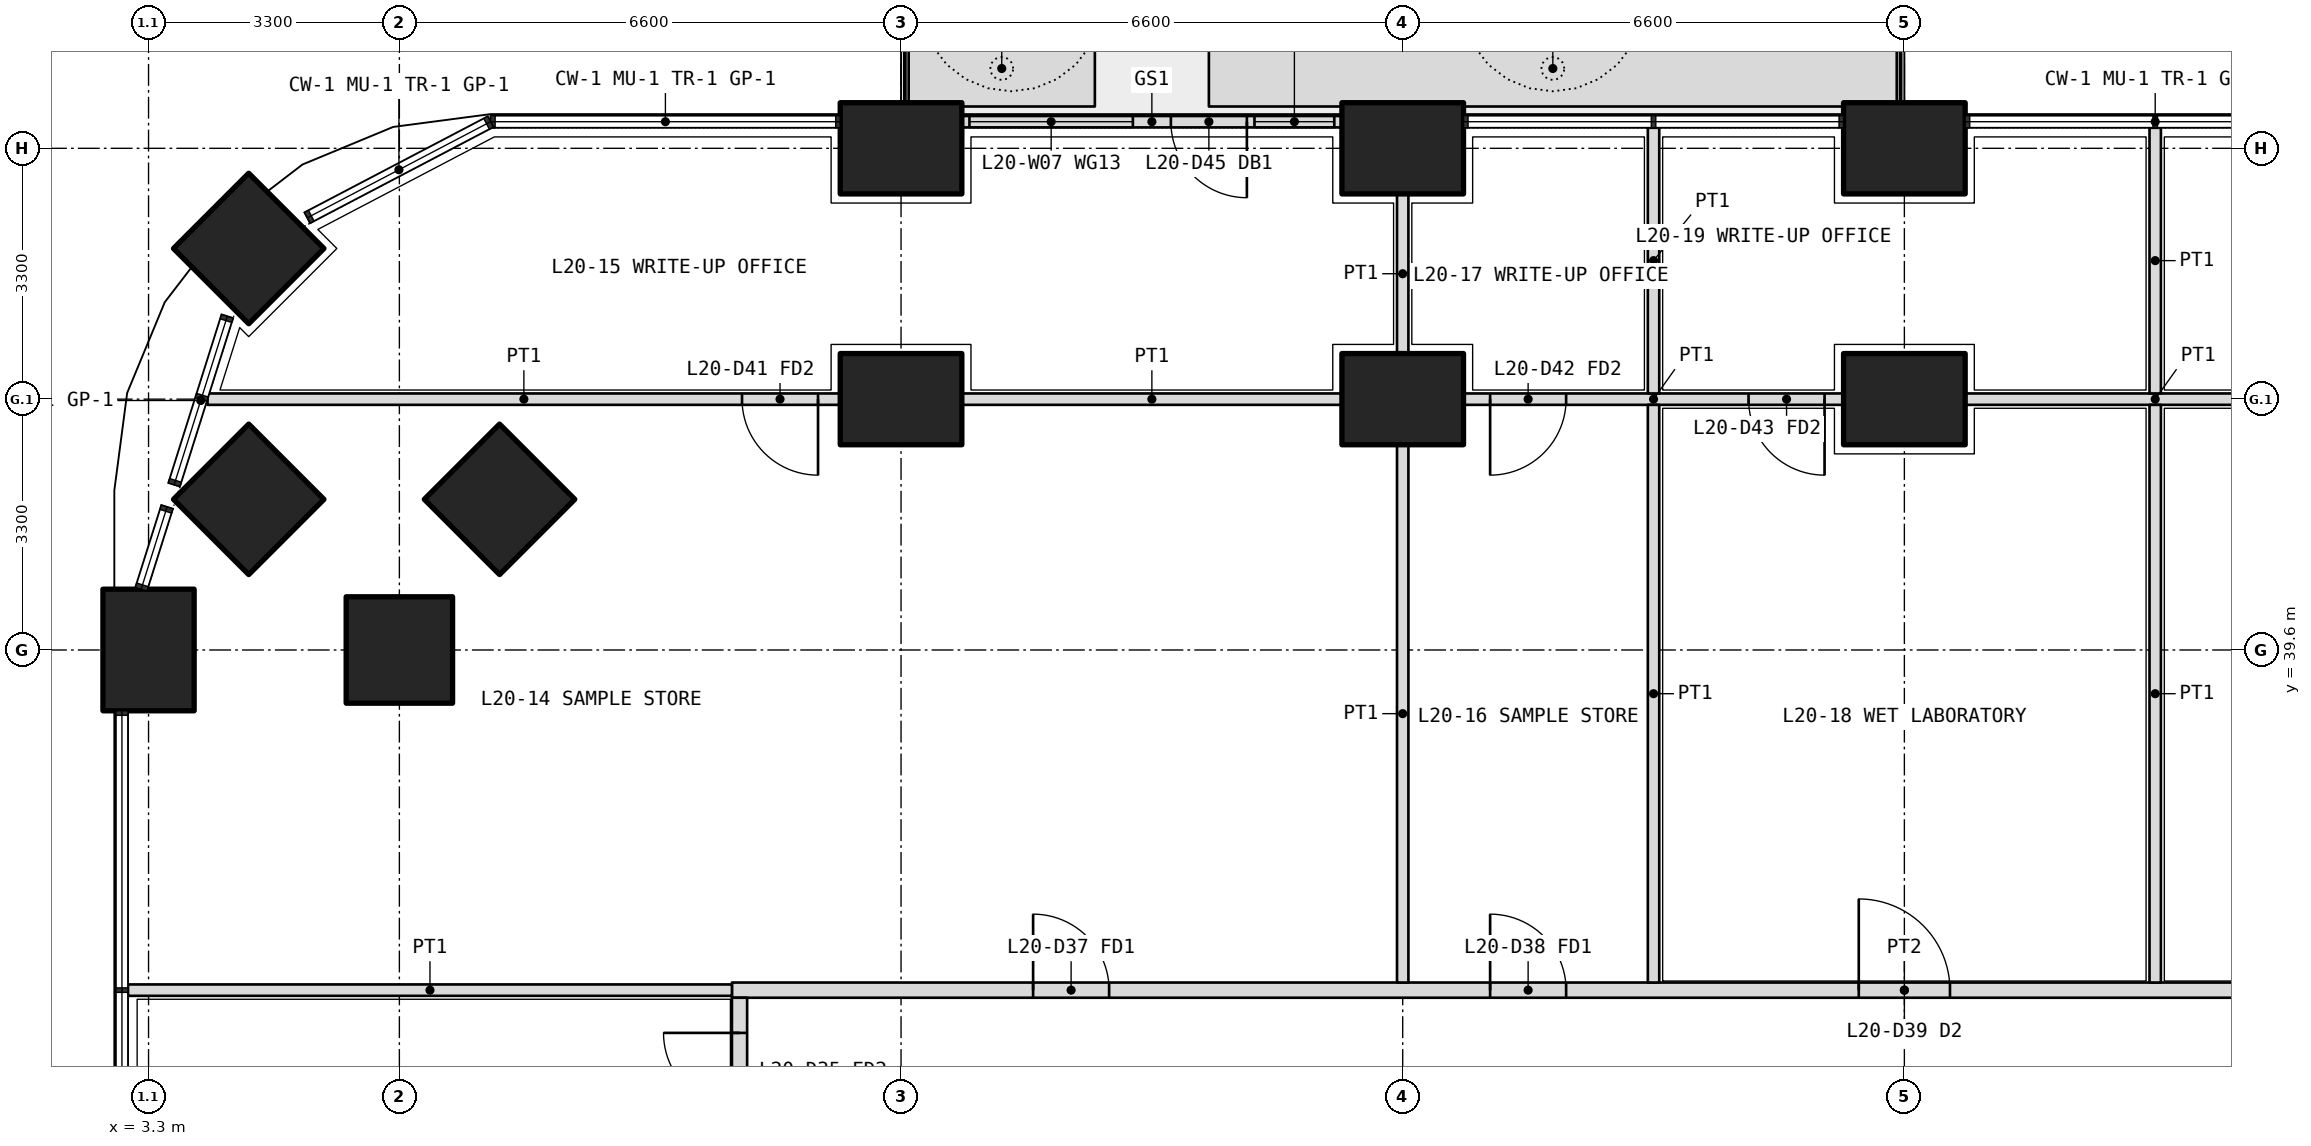
"""IFC4 building model, lengths in metres.
Left out: names, types, materials, properties, quantities, classifications, styles, units other than length and angle.
Written with IfcOpenShell. Run it as: python <this file> out.ifc"""

import sys

from ifc_helpers import new_model, si_unit, direction, frame, frame_2d, origin, origin_2d, place, context, subcontext, project, spatial, polyline, rectangle, outline, extrude, element, fill, save


model = new_model("IFC4")
c1 = context("Model", 3, precision=1e-05, world=origin(), true_north=direction((0.0, 1.0)))
c2 = subcontext(c1, "Body", "Model", "MODEL_VIEW")
j1 = project(units=[si_unit("LENGTHUNIT", "METRE"), si_unit("PLANEANGLEUNIT", "RADIAN")], contexts=[c1])
p1 = place(None, origin())
s1 = spatial("IfcSite", under=j1, at=p1, CompositionType="ELEMENT")
p2 = place(p1, origin())
s2 = spatial("IfcBuilding", under=s1, at=p2, CompositionType="ELEMENT")
p3 = place(p2, frame((0.0, 0.0, 90.6)))
s3 = spatial("IfcBuildingStorey", under=s2, at=p3, CompositionType="ELEMENT", Elevation=90.6)
p4 = place(p3, frame((4.618, 44.882, 0.0), z_axis=(0.0, 0.0, 1.0), x_axis=(0.707106781187, 0.707106781187, 0.0)))
e1 = element("IfcColumn", 1, at=p4, inside=s3, PredefinedType="COLUMN", context=c2, shape_type="SweptSolid", body=[
    extrude(rectangle(XDim=1.4, YDim=1.4, at=origin_2d()), origin(), (0.0, 0.0, 1.0), 4.2),
])
for number, where, z_axis, x_axis in (
    (2, (3.3, 39.6, 0.0), (0.0, 0.0, 1.0), (0.0, 1.0, 0.0)),
    (3, (13.2, 46.2, 0.0), (0.0, 0.0, 1.0), (1.0, 0.0, 0.0)),
    (4, (19.8, 46.2, 0.0), (0.0, 0.0, 1.0), (1.0, 0.0, 0.0)),
    (5, (26.4, 46.2, 0.0), (0.0, 0.0, 1.0), (1.0, 0.0, 0.0)),
):
    element("IfcColumn", number, at=place(p3, frame(where, z_axis=z_axis, x_axis=x_axis)), inside=s3, PredefinedType="COLUMN", context=c2, shape_type="SweptSolid", body=[
        extrude(rectangle(XDim=1.6, YDim=1.2, at=origin_2d()), origin(), (0.0, 0.0, 1.0), 4.2),
    ])
for number, where, z_axis, x_axis in (
    (6, (6.6, 39.6, 0.0), (0.0, 0.0, 1.0), (1.0, 0.0, 0.0)),
    (7, (4.618, 41.582, 0.0), (0.0, 0.0, 1.0), (0.707, 0.707, 0.0)),
):
    element("IfcColumn", number, at=place(p3, frame(where, z_axis=z_axis, x_axis=x_axis)), inside=s3, PredefinedType="COLUMN", context=c2, shape_type="SweptSolid", body=[
        extrude(rectangle(XDim=1.4, YDim=1.4, at=origin_2d()), origin(), (0.0, 0.0, 1.0), 4.2),
    ])
for number, where, z_axis, x_axis in (
    (8, (13.2, 42.9, 0.0), (0.0, 0.0, 1.0), (1.0, 0.0, 0.0)),
    (9, (19.8, 42.9, 0.0), (0.0, 0.0, 1.0), (1.0, 0.0, 0.0)),
    (10, (26.4, 42.9, 0.0), (0.0, 0.0, 1.0), (1.0, 0.0, 0.0)),
):
    element("IfcColumn", number, at=place(p3, frame(where, z_axis=z_axis, x_axis=x_axis)), inside=s3, PredefinedType="COLUMN", context=c2, shape_type="SweptSolid", body=[
        extrude(rectangle(XDim=1.6, YDim=1.2, at=origin_2d()), origin(), (0.0, 0.0, 1.0), 4.2),
    ])
p5 = place(p3, frame((7.918, 41.582, 0.0), z_axis=(0.0, 0.0, 1.0), x_axis=(0.707106781187, 0.707106781187, 0.0)))
e11 = element("IfcColumn", 11, at=p5, inside=s3, PredefinedType="COLUMN", context=c2, shape_type="SweptSolid", body=[
    extrude(rectangle(XDim=1.4, YDim=1.4, at=origin_2d()), origin(), (0.0, 0.0, 1.0), 4.2),
])
p6 = place(p3, origin())
e12 = element("IfcWall", 12, at=p6, inside=s3, PredefinedType="USERDEFINED", context=c2, shape_type="SweptSolid", body=[
    extrude(outline(polyline([(13.3, 46.75), (15.75, 46.75), (15.75, 47.75), (13.3, 47.75), (13.3, 46.75)]), holes=[polyline([(13.45, 46.9), (15.6, 46.9), (15.6, 47.6), (13.45, 47.6), (13.45, 46.9)])]), origin(), (0.0, 0.0, 1.0), 1.05),
])
p7 = place(p3, origin())
e13 = element("IfcWall", 13, at=p7, inside=s3, PredefinedType="USERDEFINED", context=c2, shape_type="SweptSolid", body=[
    extrude(outline(polyline([(17.25, 46.75), (26.3, 46.75), (26.3, 47.75), (17.25, 47.75), (17.25, 46.75)]), holes=[polyline([(17.4, 46.9), (26.15, 46.9), (26.15, 47.6), (17.4, 47.6), (17.4, 46.9)])]), origin(), (0.0, 0.0, 1.0), 1.05),
])
p8 = place(p3, frame((19.0, 46.55, 0.0), z_axis=(0.0, 0.0, 1.0), x_axis=(-1.0, 0.0, 0.0)))
e14 = element("IfcWall", 14, at=p8, inside=s3, PredefinedType="SOLIDWALL", context=c2, shape_type="SweptSolid", body=[
    extrude(rectangle(XDim=5.0, YDim=0.15, at=frame_2d((2.5, 0.0))), origin(), (0.0, 0.0, 1.0), 2.7),
])
p9 = place(p8, frame((1.25, 0.0, 0.0)))
e15 = element("IfcOpeningElement", 15, at=p9, cuts=e14, PredefinedType="OPENING", context=c2, shape_type="SweptSolid", body=[
    extrude(rectangle(XDim=1.0, YDim=2.4, at=frame_2d((0.5, 1.2))), frame((0.0, 0.085, 0.0), z_axis=(0.0, -1.0, 0.0), x_axis=(1.0, 0.0, 0.0)), (0.0, 0.0, 1.0), 0.17),
])
p10 = place(p8, frame((0.1, 0.0, 0.1)))
e16 = element("IfcOpeningElement", 16, at=p10, cuts=e14, PredefinedType="OPENING", context=c2, shape_type="SweptSolid", body=[
    extrude(rectangle(XDim=1.05, YDim=2.3, at=frame_2d((0.525, 1.15))), frame((0.0, 0.085, 0.0), z_axis=(0.0, -1.0, 0.0), x_axis=(1.0, 0.0, 0.0)), (0.0, 0.0, 1.0), 0.17),
])
p11 = place(p8, frame((2.75, 0.0, 0.1)))
e17 = element("IfcOpeningElement", 17, at=p11, cuts=e14, PredefinedType="OPENING", context=c2, shape_type="SweptSolid", body=[
    extrude(rectangle(XDim=2.15, YDim=2.3, at=frame_2d((1.075, 1.15))), frame((0.0, 0.085, 0.0), z_axis=(0.0, -1.0, 0.0), x_axis=(1.0, 0.0, 0.0)), (0.0, 0.0, 1.0), 0.17),
])
p12 = place(p3, frame((10.975, 35.125, 0.0), z_axis=(0.0, 0.0, 1.0), x_axis=(1.0, 0.0, 0.0)))
e18 = element("IfcWall", 18, at=p12, inside=s3, PredefinedType="PARTITIONING", context=c2, shape_type="SweptSolid", body=[
    extrude(rectangle(XDim=30.85, YDim=0.2, at=frame_2d((15.425, 0.0))), origin(), (0.0, 0.0, 1.0), 2.85),
])
p13 = place(p12, frame((3.962, 0.0, 0.0)))
e19 = element("IfcOpeningElement", 19, at=p13, cuts=e18, PredefinedType="OPENING", context=c2, shape_type="SweptSolid", body=[
    extrude(rectangle(XDim=1.0, YDim=2.1, at=frame_2d((0.5, 1.05))), frame((0.0, 0.11, 0.0), z_axis=(0.0, -1.0, 0.0), x_axis=(1.0, 0.0, 0.0)), (0.0, 0.0, 1.0), 0.22),
])
p14 = place(p12, frame((9.975, 0.0, 0.0)))
e20 = element("IfcOpeningElement", 20, at=p14, cuts=e18, PredefinedType="OPENING", context=c2, shape_type="SweptSolid", body=[
    extrude(rectangle(XDim=1.0, YDim=2.1, at=frame_2d((0.5, 1.05))), frame((0.0, 0.11, 0.0), z_axis=(0.0, -1.0, 0.0), x_axis=(1.0, 0.0, 0.0)), (0.0, 0.0, 1.0), 0.22),
])
p15 = place(p12, frame((14.825, 0.0, 0.0)))
e21 = element("IfcOpeningElement", 21, at=p15, cuts=e18, PredefinedType="OPENING", context=c2, shape_type="SweptSolid", body=[
    extrude(rectangle(XDim=1.2, YDim=2.1, at=frame_2d((0.6, 1.05))), frame((0.0, 0.11, 0.0), z_axis=(0.0, -1.0, 0.0), x_axis=(1.0, 0.0, 0.0)), (0.0, 0.0, 1.0), 0.22),
])
p16 = place(p12, frame((24.238, 0.0, 0.0)))
e22 = element("IfcOpeningElement", 22, at=p16, cuts=e18, PredefinedType="OPENING", context=c2, shape_type="SweptSolid", body=[
    extrude(rectangle(XDim=1.0, YDim=2.1, at=frame_2d((0.5, 1.05))), frame((0.0, 0.11, 0.0), z_axis=(0.0, -1.0, 0.0), x_axis=(1.0, 0.0, 0.0)), (0.0, 0.0, 1.0), 0.22),
])
p17 = place(p3, frame((11.075, 7.4, 0.0), z_axis=(0.0, 0.0, 1.0), x_axis=(0.0, 1.0, 0.0)))
e23 = element("IfcWall", 23, at=p17, inside=s3, PredefinedType="PARTITIONING", context=c2, shape_type="SweptSolid", body=[
    extrude(rectangle(XDim=27.625, YDim=0.2, at=frame_2d((13.812, 0.0))), origin(), (0.0, 0.0, 1.0), 2.85),
])
p18 = place(p17, frame((2.35, 0.0, 0.0)))
e24 = element("IfcOpeningElement", 24, at=p18, cuts=e23, PredefinedType="OPENING", context=c2, shape_type="SweptSolid", body=[
    extrude(rectangle(XDim=1.0, YDim=2.1, at=frame_2d((0.5, 1.05))), frame((0.0, 0.11, 0.0), z_axis=(0.0, -1.0, 0.0), x_axis=(1.0, 0.0, 0.0)), (0.0, 0.0, 1.0), 0.22),
])
p19 = place(p17, frame((6.35, 0.0, 0.0)))
e25 = element("IfcOpeningElement", 25, at=p19, cuts=e23, PredefinedType="OPENING", context=c2, shape_type="SweptSolid", body=[
    extrude(rectangle(XDim=1.0, YDim=2.1, at=frame_2d((0.5, 1.05))), frame((0.0, 0.11, 0.0), z_axis=(0.0, -1.0, 0.0), x_axis=(1.0, 0.0, 0.0)), (0.0, 0.0, 1.0), 0.22),
])
p20 = place(p17, frame((9.4, 0.0, 0.0)))
e26 = element("IfcOpeningElement", 26, at=p20, cuts=e23, PredefinedType="OPENING", context=c2, shape_type="SweptSolid", body=[
    extrude(rectangle(XDim=0.9, YDim=2.1, at=frame_2d((0.45, 1.05))), frame((0.0, 0.11, 0.0), z_axis=(0.0, -1.0, 0.0), x_axis=(1.0, 0.0, 0.0)), (0.0, 0.0, 1.0), 0.22),
])
p21 = place(p17, frame((13.2, 0.0, 0.0)))
e27 = element("IfcOpeningElement", 27, at=p21, cuts=e23, PredefinedType="OPENING", context=c2, shape_type="SweptSolid", body=[
    extrude(rectangle(XDim=0.9, YDim=2.1, at=frame_2d((0.45, 1.05))), frame((0.0, 0.11, 0.0), z_axis=(0.0, -1.0, 0.0), x_axis=(1.0, 0.0, 0.0)), (0.0, 0.0, 1.0), 0.22),
])
p22 = place(p17, frame((16.75, 0.0, 0.0)))
e28 = element("IfcOpeningElement", 28, at=p22, cuts=e23, PredefinedType="OPENING", context=c2, shape_type="SweptSolid", body=[
    extrude(rectangle(XDim=1.0, YDim=2.1, at=frame_2d((0.5, 1.05))), frame((0.0, 0.11, 0.0), z_axis=(0.0, -1.0, 0.0), x_axis=(1.0, 0.0, 0.0)), (0.0, 0.0, 1.0), 0.22),
])
p23 = place(p17, frame((20.15, 0.0, 0.0)))
e29 = element("IfcOpeningElement", 29, at=p23, cuts=e23, PredefinedType="OPENING", context=c2, shape_type="SweptSolid", body=[
    extrude(rectangle(XDim=1.0, YDim=2.1, at=frame_2d((0.5, 1.05))), frame((0.0, 0.11, 0.0), z_axis=(0.0, -1.0, 0.0), x_axis=(1.0, 0.0, 0.0)), (0.0, 0.0, 1.0), 0.22),
])
p24 = place(p17, frame((23.45, 0.0, 0.0)))
e30 = element("IfcOpeningElement", 30, at=p24, cuts=e23, PredefinedType="OPENING", context=c2, shape_type="SweptSolid", body=[
    extrude(rectangle(XDim=1.0, YDim=2.1, at=frame_2d((0.5, 1.05))), frame((0.0, 0.11, 0.0), z_axis=(0.0, -1.0, 0.0), x_axis=(1.0, 0.0, 0.0)), (0.0, 0.0, 1.0), 0.22),
])
p25 = place(p17, frame((26.163, 0.0, 0.0)))
e31 = element("IfcOpeningElement", 31, at=p25, cuts=e23, PredefinedType="OPENING", context=c2, shape_type="SweptSolid", body=[
    extrude(rectangle(XDim=1.0, YDim=2.1, at=frame_2d((0.5, 1.05))), frame((0.0, 0.11, 0.0), z_axis=(0.0, -1.0, 0.0), x_axis=(1.0, 0.0, 0.0)), (0.0, 0.0, 1.0), 0.22),
])
p26 = place(p3, frame((3.03, 35.125, 0.0), z_axis=(0.0, 0.0, 1.0), x_axis=(1.0, 0.0, 0.0)))
e32 = element("IfcWall", 32, at=p26, inside=s3, PredefinedType="PARTITIONING", context=c2, shape_type="SweptSolid", body=[
    extrude(rectangle(XDim=7.945, YDim=0.15, at=frame_2d((3.973, 0.0))), origin(), (0.0, 0.0, 1.0), 2.7),
])
p27 = place(p3, frame((32.2, 42.9, 0.0), z_axis=(0.0, 0.0, 1.0), x_axis=(-1.0, 0.0, 0.0)))
e33 = element("IfcWall", 33, at=p27, inside=s3, PredefinedType="PARTITIONING", context=c2, shape_type="SweptSolid", body=[
    extrude(rectangle(XDim=5.0, YDim=0.15, at=frame_2d((2.5, 0.0))), origin(), (0.0, 0.0, 1.0), 3.9),
])
p28 = place(p3, frame((25.6, 42.9, 0.0), z_axis=(0.0, 0.0, 1.0), x_axis=(-1.0, 0.0, 0.0)))
e34 = element("IfcWall", 34, at=p28, inside=s3, PredefinedType="PARTITIONING", context=c2, shape_type="SweptSolid", body=[
    extrude(rectangle(XDim=5.0, YDim=0.15, at=frame_2d((2.5, 0.0))), origin(), (0.0, 0.0, 1.0), 3.9),
])
p29 = place(p28, frame((3.65, 0.0, 0.0)))
e35 = element("IfcOpeningElement", 35, at=p29, cuts=e34, PredefinedType="OPENING", context=c2, shape_type="SweptSolid", body=[
    extrude(rectangle(XDim=1.0, YDim=2.1, at=frame_2d((0.5, 1.05))), frame((0.0, 0.085, 0.0), z_axis=(0.0, -1.0, 0.0), x_axis=(1.0, 0.0, 0.0)), (0.0, 0.0, 1.0), 0.17),
])
p30 = place(p28, frame((0.25, 0.0, 0.0)))
e36 = element("IfcOpeningElement", 36, at=p30, cuts=e34, PredefinedType="OPENING", context=c2, shape_type="SweptSolid", body=[
    extrude(rectangle(XDim=1.0, YDim=2.1, at=frame_2d((0.5, 1.05))), frame((0.0, 0.085, 0.0), z_axis=(0.0, -1.0, 0.0), x_axis=(1.0, 0.0, 0.0)), (0.0, 0.0, 1.0), 0.17),
])
p31 = place(p3, frame((19.0, 42.9, 0.0), z_axis=(0.0, 0.0, 1.0), x_axis=(-1.0, 0.0, 0.0)))
e37 = element("IfcWall", 37, at=p31, inside=s3, PredefinedType="PARTITIONING", context=c2, shape_type="SweptSolid", body=[
    extrude(rectangle(XDim=5.0, YDim=0.15, at=frame_2d((2.5, 0.0))), origin(), (0.0, 0.0, 1.0), 3.9),
])
p32 = place(p3, frame((12.4, 42.9, 0.0), z_axis=(0.0, 0.0, 1.0), x_axis=(-1.0, 0.0, 0.0)))
e38 = element("IfcWall", 38, at=p32, inside=s3, PredefinedType="PARTITIONING", context=c2, shape_type="SweptSolid", body=[
    extrude(rectangle(XDim=8.324, YDim=0.15, at=frame_2d((4.162, 0.0))), origin(), (0.0, 0.0, 1.0), 2.7),
])
p33 = place(p32, frame((0.292, 0.0, 0.0)))
e39 = element("IfcOpeningElement", 39, at=p33, cuts=e38, PredefinedType="OPENING", context=c2, shape_type="SweptSolid", body=[
    extrude(rectangle(XDim=1.0, YDim=2.1, at=frame_2d((0.5, 1.05))), frame((0.0, 0.085, 0.0), z_axis=(0.0, -1.0, 0.0), x_axis=(1.0, 0.0, 0.0)), (0.0, 0.0, 1.0), 0.17),
])
p34 = place(p3, frame((19.8, 45.6, 0.0), z_axis=(0.0, 0.0, 1.0), x_axis=(0.0, -1.0, 0.0)))
e40 = element("IfcWall", 40, at=p34, inside=s3, PredefinedType="PARTITIONING", context=c2, shape_type="SweptSolid", body=[
    extrude(rectangle(XDim=2.1, YDim=0.15, at=frame_2d((1.05, 0.0))), origin(), (0.0, 0.0, 1.0), 2.85),
])
p35 = place(p3, frame((19.8, 42.3, 0.0), z_axis=(0.0, 0.0, 1.0), x_axis=(0.0, -1.0, 0.0)))
e41 = element("IfcWall", 41, at=p35, inside=s3, PredefinedType="PARTITIONING", context=c2, shape_type="SweptSolid", body=[
    extrude(rectangle(XDim=7.075, YDim=0.15, at=frame_2d((3.538, 0.0))), origin(), (0.0, 0.0, 1.0), 2.85),
])
p36 = place(p3, frame((23.1, 46.47, 0.0), z_axis=(0.0, 0.0, 1.0), x_axis=(0.0, -1.0, 0.0)))
e42 = element("IfcWall", 42, at=p36, inside=s3, PredefinedType="PARTITIONING", context=c2, shape_type="SweptSolid", body=[
    extrude(rectangle(XDim=3.495, YDim=0.15, at=frame_2d((1.748, 0.0))), origin(), (0.0, 0.0, 1.0), 2.7),
])
p37 = place(p3, frame((23.1, 42.825, 0.0), z_axis=(0.0, 0.0, 1.0), x_axis=(0.0, -1.0, 0.0)))
e43 = element("IfcWall", 43, at=p37, inside=s3, PredefinedType="PARTITIONING", context=c2, shape_type="SweptSolid", body=[
    extrude(rectangle(XDim=7.6, YDim=0.15, at=frame_2d((3.8, 0.0))), origin(), (0.0, 0.0, 1.0), 3.9),
])
p38 = place(p3, frame((29.7, 46.47, 0.0), z_axis=(0.0, 0.0, 1.0), x_axis=(0.0, -1.0, 0.0)))
e44 = element("IfcWall", 44, at=p38, inside=s3, PredefinedType="PARTITIONING", context=c2, shape_type="SweptSolid", body=[
    extrude(rectangle(XDim=3.495, YDim=0.15, at=frame_2d((1.748, 0.0))), origin(), (0.0, 0.0, 1.0), 2.7),
])
p39 = place(p3, frame((29.7, 42.825, 0.0), z_axis=(0.0, 0.0, 1.0), x_axis=(0.0, -1.0, 0.0)))
e45 = element("IfcWall", 45, at=p39, inside=s3, PredefinedType="PARTITIONING", context=c2, shape_type="SweptSolid", body=[
    extrude(rectangle(XDim=7.6, YDim=0.15, at=frame_2d((3.8, 0.0))), origin(), (0.0, 0.0, 1.0), 3.9),
])
p40 = place(p9, origin())
e46 = element("IfcDoor", 46, at=p40, inside=s3, OperationType="SINGLE_SWING_LEFT", PredefinedType="DOOR", context=c2, shape_type="SweptSolid", body=[
    extrude(rectangle(XDim=1.0, YDim=2.4, at=frame_2d((0.5, 1.2))), frame((0.0, 0.025, 0.0), z_axis=(0.0, -1.0, 0.0), x_axis=(1.0, 0.0, 0.0)), (0.0, 0.0, 1.0), 0.05),
])
fill(e15, e46)
p41 = place(p10, origin())
e47 = element("IfcWindow", 47, at=p41, inside=s3, PartitioningType="SINGLE_PANEL", PredefinedType="WINDOW", context=c2, shape_type="SweptSolid", body=[
    extrude(rectangle(XDim=1.05, YDim=2.3, at=frame_2d((0.525, 1.15))), frame((0.0, 0.03, 0.0), z_axis=(0.0, -1.0, 0.0), x_axis=(1.0, 0.0, 0.0)), (0.0, 0.0, 1.0), 0.06),
])
fill(e16, e47)
p42 = place(p11, origin())
e48 = element("IfcWindow", 48, at=p42, inside=s3, PartitioningType="SINGLE_PANEL", PredefinedType="WINDOW", context=c2, shape_type="SweptSolid", body=[
    extrude(rectangle(XDim=2.15, YDim=2.3, at=frame_2d((1.075, 1.15))), frame((0.0, 0.03, 0.0), z_axis=(0.0, -1.0, 0.0), x_axis=(1.0, 0.0, 0.0)), (0.0, 0.0, 1.0), 0.06),
])
fill(e17, e48)
p43 = place(p13, origin())
e49 = element("IfcDoor", 49, at=p43, inside=s3, OperationType="SINGLE_SWING_LEFT", PredefinedType="DOOR", context=c2, shape_type="SweptSolid", body=[
    extrude(rectangle(XDim=1.0, YDim=2.1, at=frame_2d((0.5, 1.05))), frame((0.0, 0.025, 0.0), z_axis=(0.0, -1.0, 0.0), x_axis=(1.0, 0.0, 0.0)), (0.0, 0.0, 1.0), 0.05),
])
fill(e19, e49)
p44 = place(p33, origin())
e50 = element("IfcDoor", 50, at=p44, inside=s3, OperationType="SINGLE_SWING_LEFT", PredefinedType="DOOR", context=c2, shape_type="SweptSolid", body=[
    extrude(rectangle(XDim=1.0, YDim=2.1, at=frame_2d((0.5, 1.05))), frame((0.0, 0.025, 0.0), z_axis=(0.0, -1.0, 0.0), x_axis=(1.0, 0.0, 0.0)), (0.0, 0.0, 1.0), 0.05),
])
fill(e39, e50)
p45 = place(p14, origin())
e51 = element("IfcDoor", 51, at=p45, inside=s3, OperationType="SINGLE_SWING_LEFT", PredefinedType="DOOR", context=c2, shape_type="SweptSolid", body=[
    extrude(rectangle(XDim=1.0, YDim=2.1, at=frame_2d((0.5, 1.05))), frame((0.0, 0.025, 0.0), z_axis=(0.0, -1.0, 0.0), x_axis=(1.0, 0.0, 0.0)), (0.0, 0.0, 1.0), 0.05),
])
fill(e20, e51)
p46 = place(p29, origin())
e52 = element("IfcDoor", 52, at=p46, inside=s3, OperationType="SINGLE_SWING_RIGHT", PredefinedType="DOOR", context=c2, shape_type="SweptSolid", body=[
    extrude(rectangle(XDim=1.0, YDim=2.1, at=frame_2d((0.5, 1.05))), frame((0.0, 0.025, 0.0), z_axis=(0.0, -1.0, 0.0), x_axis=(1.0, 0.0, 0.0)), (0.0, 0.0, 1.0), 0.05),
])
fill(e35, e52)
p47 = place(p15, origin())
e53 = element("IfcDoor", 53, at=p47, inside=s3, OperationType="DOUBLE_DOOR_SINGLE_SWING", PredefinedType="DOOR", context=c2, shape_type="SweptSolid", body=[
    extrude(rectangle(XDim=1.2, YDim=2.1, at=frame_2d((0.6, 1.05))), frame((0.0, 0.025, 0.0), z_axis=(0.0, -1.0, 0.0), x_axis=(1.0, 0.0, 0.0)), (0.0, 0.0, 1.0), 0.05),
])
fill(e21, e53)
p48 = place(p30, origin())
e54 = element("IfcDoor", 54, at=p48, inside=s3, OperationType="SINGLE_SWING_LEFT", PredefinedType="DOOR", context=c2, shape_type="SweptSolid", body=[
    extrude(rectangle(XDim=1.0, YDim=2.1, at=frame_2d((0.5, 1.05))), frame((0.0, 0.025, 0.0), z_axis=(0.0, -1.0, 0.0), x_axis=(1.0, 0.0, 0.0)), (0.0, 0.0, 1.0), 0.05),
])
fill(e36, e54)
p49 = place(p25, origin())
e55 = element("IfcDoor", 55, at=p49, inside=s3, OperationType="SINGLE_SWING_RIGHT", PredefinedType="DOOR", context=c2, shape_type="SweptSolid", body=[
    extrude(rectangle(XDim=1.0, YDim=2.1, at=frame_2d((0.5, 1.05))), frame((0.0, 0.025, 0.0), z_axis=(0.0, -1.0, 0.0), x_axis=(1.0, 0.0, 0.0)), (0.0, 0.0, 1.0), 0.05),
])
fill(e31, e55)
save(model, sys.argv[1])
